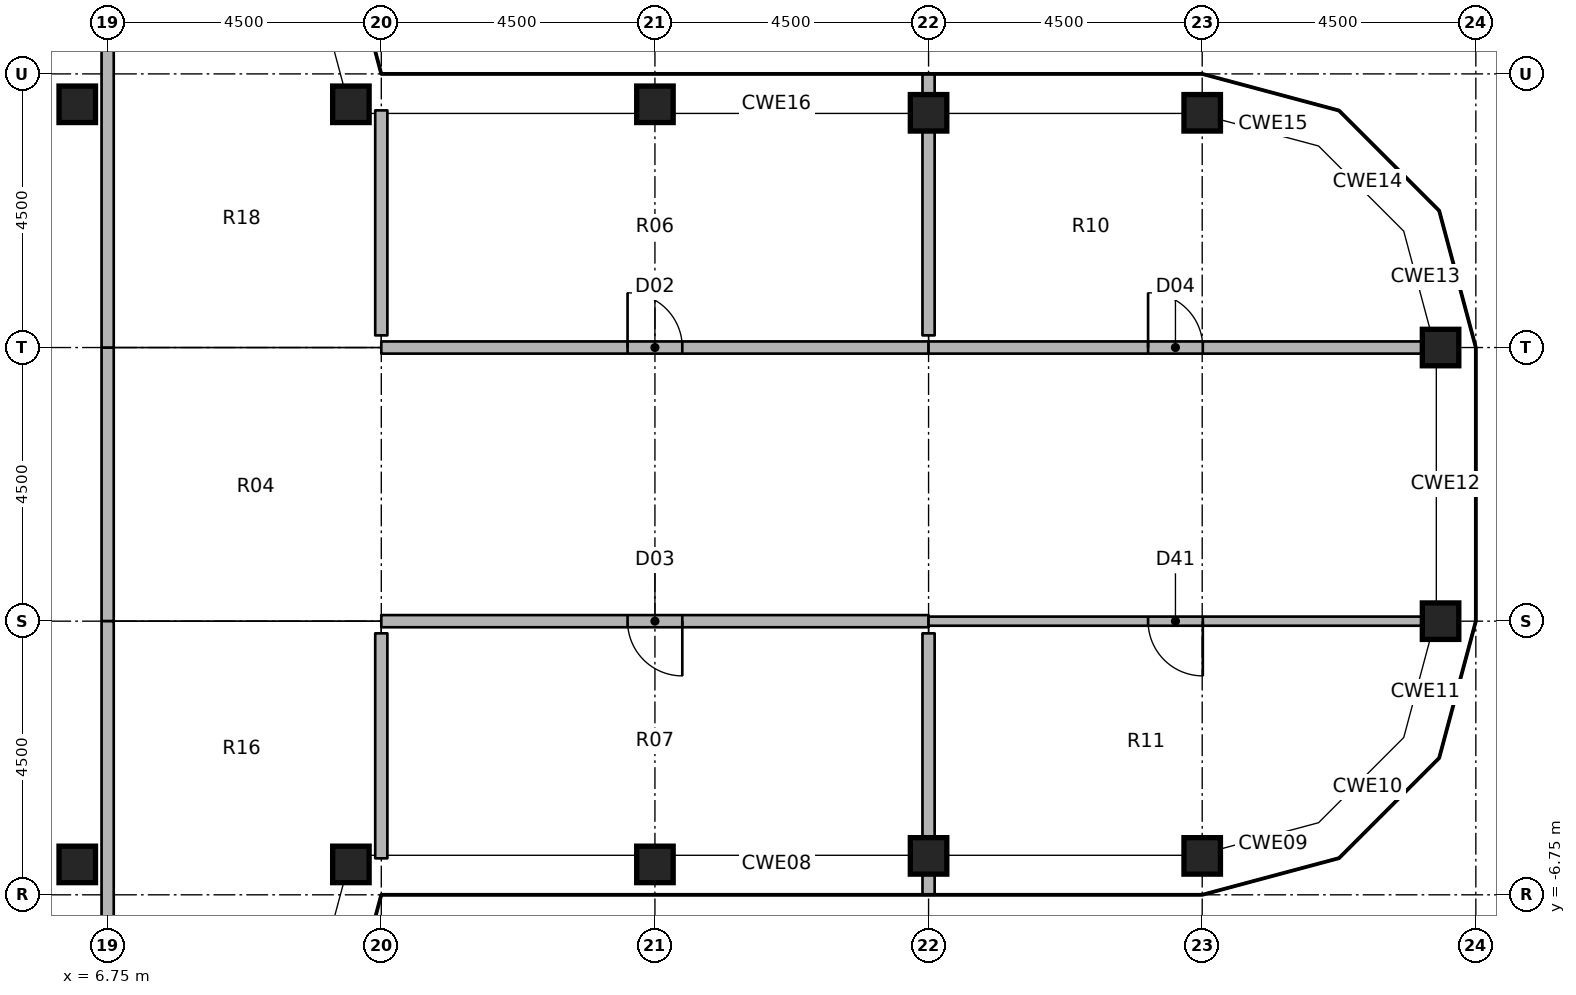
"""IFC4 building model, lengths in metres.
Left out: names, types, materials, properties, quantities, classifications, styles, units other than length and angle.
Written with IfcOpenShell. Run it as: python <this file> out.ifc"""

import sys

from ifc_helpers import new_model, si_unit, direction, frame, frame_2d, origin, origin_2d, place, context, subcontext, project, spatial, rectangle, extrude, element, fill, save


model = new_model("IFC4")
c1 = context("Model", 3, precision=1e-05, world=origin(), true_north=direction((0.0, 1.0)))
c2 = subcontext(c1, "Body", "Model", "MODEL_VIEW")
j1 = project(units=[si_unit("LENGTHUNIT", "METRE"), si_unit("PLANEANGLEUNIT", "RADIAN")], contexts=[c1])
p1 = place(None, origin())
s1 = spatial("IfcSite", under=j1, at=p1, CompositionType="ELEMENT")
p2 = place(p1, origin())
s2 = spatial("IfcBuilding", under=s1, at=p2, CompositionType="ELEMENT")
p3 = place(p2, frame((0.0, 0.0, 284.0)))
s3 = spatial("IfcBuildingStorey", under=s2, at=p3, CompositionType="ELEMENT", Elevation=284.0)
for number, where, z_axis, x_axis in (
    (1, (6.25, -6.25, 0.0), (0.0, 0.0, 1.0), (1.0, 0.0, 0.0)),
    (2, (6.25, 6.25, 0.0), (0.0, 0.0, 1.0), (1.0, 0.0, 0.0)),
    (3, (10.75, -6.25, 0.0), (0.0, 0.0, 1.0), (1.0, 0.0, 0.0)),
    (4, (10.75, 6.25, 0.0), (0.0, 0.0, 1.0), (1.0, 0.0, 0.0)),
    (5, (15.75, -6.25, 0.0), (0.0, 0.0, 1.0), (1.0, 0.0, 0.0)),
    (6, (15.75, 6.25, 0.0), (0.0, 0.0, 1.0), (1.0, 0.0, 0.0)),
    (7, (20.25, -6.11, 0.0), (0.0, 0.0, 1.0), (1.0, 0.0, 0.0)),
    (8, (20.25, 6.11, 0.0), (0.0, 0.0, 1.0), (1.0, 0.0, 0.0)),
    (9, (24.75, -6.11, 0.0), (0.0, 0.0, 1.0), (1.0, 0.0, 0.0)),
    (10, (24.75, 6.11, 0.0), (0.0, 0.0, 1.0), (1.0, 0.0, 0.0)),
    (11, (28.67, -2.25, 0.0), (0.0, 0.0, 1.0), (1.0, 0.0, 0.0)),
    (12, (28.67, 2.25, 0.0), (0.0, 0.0, 1.0), (1.0, 0.0, 0.0)),
):
    element("IfcColumn", number, at=place(p3, frame(where, z_axis=z_axis, x_axis=x_axis)), inside=s3, PredefinedType="COLUMN", context=c2, shape_type="SweptSolid", body=[
        extrude(rectangle(XDim=0.6, YDim=0.6, at=origin_2d()), origin(), (0.0, 0.0, 1.0), 7.45),
    ])
p4 = place(p3, frame((6.75, 2.25, 0.0), z_axis=(0.0, 0.0, 1.0), x_axis=(0.0, -1.0, 0.0)))
e13 = element("IfcWall", 13, at=p4, inside=s3, PredefinedType="PARTITIONING", context=c2, shape_type="SweptSolid", body=[
    extrude(rectangle(XDim=4.5, YDim=0.2, at=frame_2d((2.25, 0.0))), origin(), (0.0, 0.0, 1.0), 7.45),
])
for number, where, z_axis, x_axis in (
    (14, (6.75, -2.25, 0.0), (0.0, 0.0, 1.0), (0.0, -1.0, 0.0)),
    (15, (6.75, 8.05, 0.0), (0.0, 0.0, 1.0), (0.0, -1.0, 0.0)),
):
    element("IfcWall", number, at=place(p3, frame(where, z_axis=z_axis, x_axis=x_axis)), inside=s3, PredefinedType="PARTITIONING", context=c2, shape_type="SweptSolid", body=[
        extrude(rectangle(XDim=5.8, YDim=0.2, at=frame_2d((2.9, 0.0))), origin(), (0.0, 0.0, 1.0), 6.681),
    ])
p5 = place(p3, frame((11.25, 2.25, 0.0), z_axis=(0.0, 0.0, 1.0), x_axis=(1.0, 0.0, 0.0)))
e16 = element("IfcWall", 16, at=p5, inside=s3, PredefinedType="PARTITIONING", context=c2, shape_type="SweptSolid", body=[
    extrude(rectangle(XDim=9.0, YDim=0.2, at=frame_2d((4.5, 0.0))), origin(), (0.0, 0.0, 1.0), 6.828),
])
p6 = place(p5, frame((4.05, 0.0, 0.0)))
e17 = element("IfcOpeningElement", 17, at=p6, cuts=e16, PredefinedType="OPENING", context=c2, shape_type="SweptSolid", body=[
    extrude(rectangle(XDim=0.9, YDim=2.1, at=frame_2d((0.45, 1.05))), frame((0.0, 0.11, 0.0), z_axis=(0.0, -1.0, 0.0), x_axis=(1.0, 0.0, 0.0)), (0.0, 0.0, 1.0), 0.22),
])
p7 = place(p3, frame((20.25, -2.25, 0.0), z_axis=(0.0, 0.0, 1.0), x_axis=(-1.0, 0.0, 0.0)))
e18 = element("IfcWall", 18, at=p7, inside=s3, PredefinedType="PARTITIONING", context=c2, shape_type="SweptSolid", body=[
    extrude(rectangle(XDim=9.0, YDim=0.2, at=frame_2d((4.5, 0.0))), origin(), (0.0, 0.0, 1.0), 6.828),
])
p8 = place(p7, frame((4.05, 0.0, 0.0)))
e19 = element("IfcOpeningElement", 19, at=p8, cuts=e18, PredefinedType="OPENING", context=c2, shape_type="SweptSolid", body=[
    extrude(rectangle(XDim=0.9, YDim=2.1, at=frame_2d((0.45, 1.05))), frame((0.0, 0.11, 0.0), z_axis=(0.0, -1.0, 0.0), x_axis=(1.0, 0.0, 0.0)), (0.0, 0.0, 1.0), 0.22),
])
p9 = place(p3, frame((20.25, 2.25, 0.0), z_axis=(0.0, 0.0, 1.0), x_axis=(1.0, 0.0, 0.0)))
e20 = element("IfcWall", 20, at=p9, inside=s3, PredefinedType="PARTITIONING", context=c2, shape_type="SweptSolid", body=[
    extrude(rectangle(XDim=8.12, YDim=0.2, at=frame_2d((4.06, 0.0))), origin(), (0.0, 0.0, 1.0), 6.53),
])
p10 = place(p9, frame((3.61, 0.0, 0.0)))
e21 = element("IfcOpeningElement", 21, at=p10, cuts=e20, PredefinedType="OPENING", context=c2, shape_type="SweptSolid", body=[
    extrude(rectangle(XDim=0.9, YDim=2.1, at=frame_2d((0.45, 1.05))), frame((0.0, 0.11, 0.0), z_axis=(0.0, -1.0, 0.0), x_axis=(1.0, 0.0, 0.0)), (0.0, 0.0, 1.0), 0.22),
])
p11 = place(p3, frame((28.37, -2.25, 0.0), z_axis=(0.0, 0.0, 1.0), x_axis=(-1.0, 0.0, 0.0)))
e22 = element("IfcWall", 22, at=p11, inside=s3, PredefinedType="PARTITIONING", context=c2, shape_type="SweptSolid", body=[
    extrude(rectangle(XDim=8.12, YDim=0.15, at=frame_2d((4.06, 0.0))), origin(), (0.0, 0.0, 1.0), 6.53),
])
p12 = place(p11, frame((3.61, 0.0, 0.0)))
e23 = element("IfcOpeningElement", 23, at=p12, cuts=e22, PredefinedType="OPENING", context=c2, shape_type="SweptSolid", body=[
    extrude(rectangle(XDim=0.9, YDim=2.1, at=frame_2d((0.45, 1.05))), frame((0.0, 0.085, 0.0), z_axis=(0.0, -1.0, 0.0), x_axis=(1.0, 0.0, 0.0)), (0.0, 0.0, 1.0), 0.17),
])
p13 = place(p3, frame((20.25, 6.75, 0.0), z_axis=(0.0, 0.0, 1.0), x_axis=(0.0, -1.0, 0.0)))
e24 = element("IfcWall", 24, at=p13, inside=s3, PredefinedType="PARTITIONING", context=c2, shape_type="SweptSolid", body=[
    extrude(rectangle(XDim=0.34, YDim=0.2, at=frame_2d((0.17, 0.0))), origin(), (0.0, 0.0, 1.0), 7.45),
])
p14 = place(p3, frame((20.25, 5.81, 0.0), z_axis=(0.0, 0.0, 1.0), x_axis=(0.0, -1.0, 0.0)))
e25 = element("IfcWall", 25, at=p14, inside=s3, PredefinedType="PARTITIONING", context=c2, shape_type="SweptSolid", body=[
    extrude(rectangle(XDim=3.36, YDim=0.2, at=frame_2d((1.68, 0.0))), origin(), (0.0, 0.0, 1.0), 7.45),
])
p15 = place(p3, frame((11.25, 2.45, 0.0), z_axis=(0.0, 0.0, 1.0), x_axis=(0.0, 1.0, 0.0)))
e26 = element("IfcWall", 26, at=p15, inside=s3, PredefinedType="PARTITIONING", context=c2, shape_type="SweptSolid", body=[
    extrude(rectangle(XDim=3.7, YDim=0.2, at=frame_2d((1.85, 0.0))), origin(), (0.0, 0.0, 1.0), 7.45),
])
p16 = place(p3, frame((20.25, -2.45, 0.0), z_axis=(0.0, 0.0, 1.0), x_axis=(0.0, -1.0, 0.0)))
e27 = element("IfcWall", 27, at=p16, inside=s3, PredefinedType="PARTITIONING", context=c2, shape_type="SweptSolid", body=[
    extrude(rectangle(XDim=3.36, YDim=0.2, at=frame_2d((1.68, 0.0))), origin(), (0.0, 0.0, 1.0), 7.45),
])
p17 = place(p3, frame((20.25, -6.41, 0.0), z_axis=(0.0, 0.0, 1.0), x_axis=(0.0, -1.0, 0.0)))
e28 = element("IfcWall", 28, at=p17, inside=s3, PredefinedType="PARTITIONING", context=c2, shape_type="SweptSolid", body=[
    extrude(rectangle(XDim=0.34, YDim=0.2, at=frame_2d((0.17, 0.0))), origin(), (0.0, 0.0, 1.0), 7.45),
])
p18 = place(p3, frame((11.25, -6.15, 0.0), z_axis=(0.0, 0.0, 1.0), x_axis=(0.0, 1.0, 0.0)))
e29 = element("IfcWall", 29, at=p18, inside=s3, PredefinedType="PARTITIONING", context=c2, shape_type="SweptSolid", body=[
    extrude(rectangle(XDim=3.7, YDim=0.2, at=frame_2d((1.85, 0.0))), origin(), (0.0, 0.0, 1.0), 7.45),
])
p19 = place(p6, origin())
e30 = element("IfcDoor", 30, at=p19, inside=s3, OperationType="SINGLE_SWING_LEFT", PredefinedType="DOOR", context=c2, shape_type="SweptSolid", body=[
    extrude(rectangle(XDim=0.9, YDim=2.1, at=frame_2d((0.45, 1.05))), frame((0.0, 0.025, 0.0), z_axis=(0.0, -1.0, 0.0), x_axis=(1.0, 0.0, 0.0)), (0.0, 0.0, 1.0), 0.05),
])
fill(e17, e30)
p20 = place(p8, origin())
e31 = element("IfcDoor", 31, at=p20, inside=s3, OperationType="SINGLE_SWING_LEFT", PredefinedType="DOOR", context=c2, shape_type="SweptSolid", body=[
    extrude(rectangle(XDim=0.9, YDim=2.1, at=frame_2d((0.45, 1.05))), frame((0.0, 0.025, 0.0), z_axis=(0.0, -1.0, 0.0), x_axis=(1.0, 0.0, 0.0)), (0.0, 0.0, 1.0), 0.05),
])
fill(e19, e31)
p21 = place(p10, origin())
e32 = element("IfcDoor", 32, at=p21, inside=s3, OperationType="SINGLE_SWING_LEFT", PredefinedType="DOOR", context=c2, shape_type="SweptSolid", body=[
    extrude(rectangle(XDim=0.9, YDim=2.1, at=frame_2d((0.45, 1.05))), frame((0.0, 0.025, 0.0), z_axis=(0.0, -1.0, 0.0), x_axis=(1.0, 0.0, 0.0)), (0.0, 0.0, 1.0), 0.05),
])
fill(e21, e32)
p22 = place(p12, origin())
e33 = element("IfcDoor", 33, at=p22, inside=s3, OperationType="SINGLE_SWING_LEFT", PredefinedType="DOOR", context=c2, shape_type="SweptSolid", body=[
    extrude(rectangle(XDim=0.9, YDim=2.1, at=frame_2d((0.45, 1.05))), frame((0.0, 0.025, 0.0), z_axis=(0.0, -1.0, 0.0), x_axis=(1.0, 0.0, 0.0)), (0.0, 0.0, 1.0), 0.05),
])
fill(e23, e33)
save(model, sys.argv[1])
